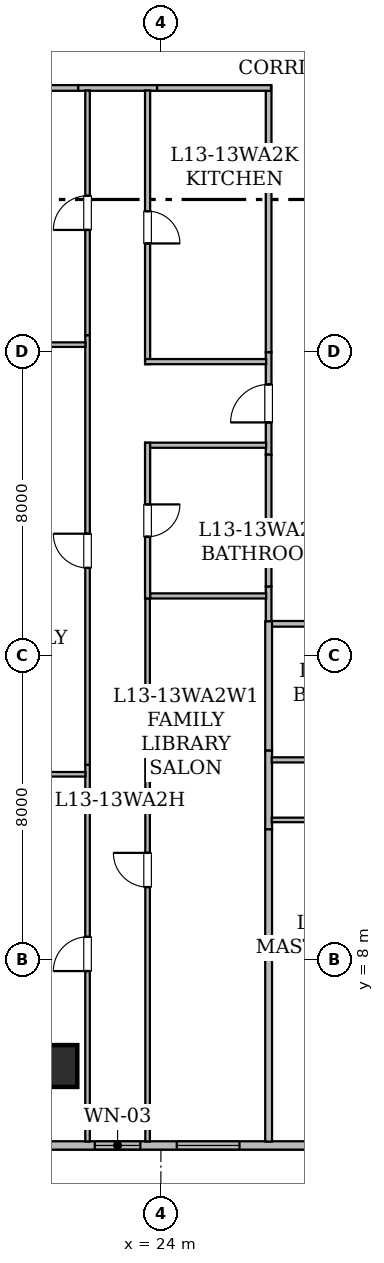
"""IFC4 building model, lengths in metres.
Left out: names, types, materials, properties, quantities, classifications, styles, units other than length and angle.
Written with IfcOpenShell. Run it as: python <this file> out.ifc"""

import sys

from ifc_helpers import new_model, si_unit, direction, frame, frame_2d, origin, origin_2d, place, context, subcontext, project, spatial, rectangle, hollow_rectangle, extrude, element, fill, save


model = new_model("IFC4")
c1 = context("Model", 3, precision=1e-05, world=origin(), true_north=direction((0.0, 1.0)))
c2 = subcontext(c1, "Body", "Model", "MODEL_VIEW")
j1 = project(units=[si_unit("LENGTHUNIT", "METRE"), si_unit("PLANEANGLEUNIT", "RADIAN")], contexts=[c1])
p1 = place(None, origin())
s1 = spatial("IfcSite", under=j1, at=p1, CompositionType="ELEMENT")
p2 = place(p1, origin())
s2 = spatial("IfcBuilding", under=s1, at=p2, CompositionType="ELEMENT")
p3 = place(p2, frame((0.0, 0.0, 55.2)))
s3 = spatial("IfcBuildingStorey", under=s2, at=p3, CompositionType="ELEMENT", Elevation=55.2)
p4 = place(p3, frame((21.25, 5.2, 0.0), z_axis=(0.0, 0.0, 1.0), x_axis=(1.0, 0.0, 0.0)))
e1 = element("IfcColumn", 1, at=p4, inside=s3, PredefinedType="COLUMN", context=c2, shape_type="SweptSolid", body=[
    extrude(hollow_rectangle(XDim=1.1, YDim=1.1, WallThickness=0.055, at=origin_2d()), origin(), (0.0, 0.0, 1.0), 3.65),
])
p5 = place(p3, frame((45.683, 3.11, 0.0), z_axis=(0.0, 0.0, 1.0), x_axis=(-1.0, 0.0, 0.0)))
e2 = element("IfcWall", 2, at=p5, inside=s3, PredefinedType="STANDARD", context=c2, shape_type="SweptSolid", body=[
    extrude(rectangle(XDim=37.368, YDim=0.22, at=frame_2d((18.684, 0.0))), origin(), (0.0, 0.0, 1.0), 3.43),
])
p6 = place(p5, frame((31.194, 0.0, 0.85)))
e3 = element("IfcOpeningElement", 3, at=p6, cuts=e2, PredefinedType="OPENING", context=c2, shape_type="SweptSolid", body=[
    extrude(rectangle(XDim=1.65, YDim=1.55, at=frame_2d((0.825, 0.775))), frame((0.0, 0.12, 0.0), z_axis=(0.0, -1.0, 0.0), x_axis=(1.0, 0.0, 0.0)), (0.0, 0.0, 1.0), 0.24),
])
p7 = place(p5, frame((19.615, 0.0, 0.85)))
e4 = element("IfcOpeningElement", 4, at=p7, cuts=e2, PredefinedType="OPENING", context=c2, shape_type="SweptSolid", body=[
    extrude(rectangle(XDim=1.65, YDim=1.55, at=frame_2d((0.825, 0.775))), frame((0.0, 0.12, 0.0), z_axis=(0.0, -1.0, 0.0), x_axis=(1.0, 0.0, 0.0)), (0.0, 0.0, 1.0), 0.24),
])
p8 = place(p5, frame((22.223, 0.0, 0.8)))
e5 = element("IfcOpeningElement", 5, at=p8, cuts=e2, PredefinedType="OPENING", context=c2, shape_type="SweptSolid", body=[
    extrude(rectangle(XDim=1.2, YDim=1.5, at=frame_2d((0.6, 0.75))), frame((0.0, 0.12, 0.0), z_axis=(0.0, -1.0, 0.0), x_axis=(1.0, 0.0, 0.0)), (0.0, 0.0, 1.0), 0.24),
])
p9 = place(p5, frame((25.65, 0.0, 0.85)))
e6 = element("IfcOpeningElement", 6, at=p9, cuts=e2, PredefinedType="OPENING", context=c2, shape_type="SweptSolid", body=[
    extrude(rectangle(XDim=1.65, YDim=1.55, at=frame_2d((0.825, 0.775))), frame((0.0, 0.12, 0.0), z_axis=(0.0, -1.0, 0.0), x_axis=(1.0, 0.0, 0.0)), (0.0, 0.0, 1.0), 0.24),
])
p10 = place(p5, frame((10.983, 0.0, 0.8)))
e7 = element("IfcOpeningElement", 7, at=p10, cuts=e2, PredefinedType="OPENING", context=c2, shape_type="SweptSolid", body=[
    extrude(rectangle(XDim=1.2, YDim=1.5, at=frame_2d((0.6, 0.75))), frame((0.0, 0.12, 0.0), z_axis=(0.0, -1.0, 0.0), x_axis=(1.0, 0.0, 0.0)), (0.0, 0.0, 1.0), 0.24),
])
p11 = place(p5, frame((14.783, 0.0, 0.85)))
e8 = element("IfcOpeningElement", 8, at=p11, cuts=e2, PredefinedType="OPENING", context=c2, shape_type="SweptSolid", body=[
    extrude(rectangle(XDim=1.65, YDim=1.55, at=frame_2d((0.825, 0.775))), frame((0.0, 0.12, 0.0), z_axis=(0.0, -1.0, 0.0), x_axis=(1.0, 0.0, 0.0)), (0.0, 0.0, 1.0), 0.24),
])
p12 = place(p5, frame((6.733, 0.0, 0.85)))
e9 = element("IfcOpeningElement", 9, at=p12, cuts=e2, PredefinedType="OPENING", context=c2, shape_type="SweptSolid", body=[
    extrude(rectangle(XDim=1.65, YDim=1.55, at=frame_2d((0.825, 0.775))), frame((0.0, 0.12, 0.0), z_axis=(0.0, -1.0, 0.0), x_axis=(1.0, 0.0, 0.0)), (0.0, 0.0, 1.0), 0.24),
])
p13 = place(p5, frame((1.738, 0.0, 0.85)))
e10 = element("IfcOpeningElement", 10, at=p13, cuts=e2, PredefinedType="OPENING", context=c2, shape_type="SweptSolid", body=[
    extrude(rectangle(XDim=1.65, YDim=1.55, at=frame_2d((0.825, 0.775))), frame((0.0, 0.12, 0.0), z_axis=(0.0, -1.0, 0.0), x_axis=(1.0, 0.0, 0.0)), (0.0, 0.0, 1.0), 0.24),
])
p14 = place(p3, frame((26.835, 16.9, 0.0), z_axis=(0.0, 0.0, 1.0), x_axis=(0.0, 1.0, 0.0)))
e11 = element("IfcWall", 11, at=p14, inside=s3, PredefinedType="STANDARD", context=c2, shape_type="SweptSolid", body=[
    extrude(rectangle(XDim=0.918, YDim=0.15, at=frame_2d((0.459, 0.0))), origin(), (0.0, 0.0, 1.0), 3.43),
])
p15 = place(p3, frame((26.835, 21.285, 0.0), z_axis=(0.0, 0.0, 1.0), x_axis=(0.0, 1.0, 0.0)))
e12 = element("IfcWall", 12, at=p15, inside=s3, PredefinedType="STANDARD", context=c2, shape_type="SweptSolid", body=[
    extrude(rectangle(XDim=2.698, YDim=0.15, at=frame_2d((1.349, 0.0))), origin(), (0.0, 0.0, 1.0), 3.43),
])
p16 = place(p15, frame((0.849, 0.0, 0.0)))
e13 = element("IfcOpeningElement", 13, at=p16, cuts=e12, PredefinedType="OPENING", context=c2, shape_type="SweptSolid", body=[
    extrude(rectangle(XDim=1.0, YDim=2.15, at=frame_2d((0.5, 1.075))), frame((0.0, 0.085, 0.0), z_axis=(0.0, -1.0, 0.0), x_axis=(1.0, 0.0, 0.0)), (0.0, 0.0, 1.0), 0.17),
])
p17 = place(p3, frame((23.9, 30.935, 0.0), z_axis=(0.0, 0.0, 1.0), x_axis=(-1.0, 0.0, 0.0)))
e14 = element("IfcWall", 14, at=p17, inside=s3, PredefinedType="STANDARD", context=c2, shape_type="SweptSolid", body=[
    extrude(rectangle(XDim=2.079, YDim=0.15, at=frame_2d((1.04, 0.0))), origin(), (0.0, 0.0, 1.0), 3.43),
])
p18 = place(p3, frame((26.835, 17.818, 0.0), z_axis=(0.0, 0.0, 1.0), x_axis=(0.0, 1.0, 0.0)))
e15 = element("IfcWall", 15, at=p18, inside=s3, PredefinedType="STANDARD", context=c2, shape_type="SweptSolid", body=[
    extrude(rectangle(XDim=3.467, YDim=0.15, at=frame_2d((1.733, 0.0))), origin(), (0.0, 0.0, 1.0), 2.647),
])
p19 = place(p3, frame((26.835, 23.983, 0.0), z_axis=(0.0, 0.0, 1.0), x_axis=(0.0, 1.0, 0.0)))
e16 = element("IfcWall", 16, at=p19, inside=s3, PredefinedType="STANDARD", context=c2, shape_type="SweptSolid", body=[
    extrude(rectangle(XDim=7.017, YDim=0.15, at=frame_2d((3.509, 0.0))), origin(), (0.0, 0.0, 1.0), 2.957),
])
p20 = place(p3, frame((26.898, 30.935, 0.0), z_axis=(0.0, 0.0, 1.0), x_axis=(-1.0, 0.0, 0.0)))
e17 = element("IfcWall", 17, at=p20, inside=s3, PredefinedType="STANDARD", context=c2, shape_type="SweptSolid", body=[
    extrude(rectangle(XDim=2.998, YDim=0.15, at=frame_2d((1.499, 0.0))), origin(), (0.0, 0.0, 1.0), 3.43),
])
p21 = place(p3, frame((21.821, 30.935, 0.0), z_axis=(0.0, 0.0, 1.0), x_axis=(-1.0, 0.0, 0.0)))
e18 = element("IfcWall", 18, at=p21, inside=s3, PredefinedType="STANDARD", context=c2, shape_type="SweptSolid", body=[
    extrude(rectangle(XDim=5.225, YDim=0.15, at=frame_2d((2.613, 0.0))), origin(), (0.0, 0.0, 1.0), 2.647),
])
p22 = place(p3, frame((31.601, 16.835, 0.0), z_axis=(0.0, 0.0, 1.0), x_axis=(-1.0, 0.0, 0.0)))
e19 = element("IfcWall", 19, at=p22, inside=s3, PredefinedType="STANDARD", context=c2, shape_type="SweptSolid", body=[
    extrude(rectangle(XDim=4.701, YDim=0.15, at=frame_2d((2.351, 0.0))), origin(), (0.0, 0.0, 1.0), 2.647),
])
p23 = place(p3, frame((23.65, 3.212, 0.0), z_axis=(0.0, 0.0, 1.0), x_axis=(0.0, 1.0, 0.0)))
e20 = element("IfcWall", 20, at=p23, inside=s3, PredefinedType="PARTITIONING", context=c2, shape_type="SweptSolid", body=[
    extrude(rectangle(XDim=14.292, YDim=0.12, at=frame_2d((7.146, 0.0))), origin(), (0.0, 0.0, 1.0), 2.803),
])
p24 = place(p23, frame((6.696, 0.0, 0.0)))
e21 = element("IfcOpeningElement", 21, at=p24, cuts=e20, PredefinedType="OPENING", context=c2, shape_type="SweptSolid", body=[
    extrude(rectangle(XDim=0.9, YDim=2.1, at=frame_2d((0.45, 1.05))), frame((0.0, 0.07, 0.0), z_axis=(0.0, -1.0, 0.0), x_axis=(1.0, 0.0, 0.0)), (0.0, 0.0, 1.0), 0.14),
])
p25 = place(p3, frame((23.715, 17.569, 0.0), z_axis=(0.0, 0.0, 1.0), x_axis=(1.0, 0.0, 0.0)))
e22 = element("IfcWall", 22, at=p25, inside=s3, PredefinedType="PARTITIONING", context=c2, shape_type="SweptSolid", body=[
    extrude(rectangle(XDim=3.055, YDim=0.135, at=frame_2d((1.527, 0.0))), origin(), (0.0, 0.0, 1.0), 3.43),
])
p26 = place(p3, frame((26.835, 13.504, 0.0), z_axis=(0.0, 0.0, 1.0), x_axis=(0.0, -1.0, 0.0)))
e23 = element("IfcWall", 23, at=p26, inside=s3, PredefinedType="STANDARD", context=c2, shape_type="SweptSolid", body=[
    extrude(rectangle(XDim=2.078, YDim=0.18, at=frame_2d((1.039, 0.0))), origin(), (0.0, 0.0, 1.0), 3.43),
])
p27 = place(p3, frame((26.835, 16.9, 0.0), z_axis=(0.0, 0.0, 1.0), x_axis=(0.0, -1.0, 0.0)))
e24 = element("IfcWall", 24, at=p27, inside=s3, PredefinedType="STANDARD", context=c2, shape_type="SweptSolid", body=[
    extrude(rectangle(XDim=3.396, YDim=0.18, at=frame_2d((1.698, 0.0))), origin(), (0.0, 0.0, 1.0), 3.43),
])
p28 = place(p3, frame((26.835, 11.426, 0.0), z_axis=(0.0, 0.0, 1.0), x_axis=(0.0, -1.0, 0.0)))
e25 = element("IfcWall", 25, at=p28, inside=s3, PredefinedType="STANDARD", context=c2, shape_type="SweptSolid", body=[
    extrude(rectangle(XDim=8.214, YDim=0.18, at=frame_2d((4.107, 0.0))), origin(), (0.0, 0.0, 1.0), 2.803),
])
p29 = place(p3, frame((26.77, 21.534, 0.0), z_axis=(0.0, 0.0, 1.0), x_axis=(-1.0, 0.0, 0.0)))
e26 = element("IfcWall", 26, at=p29, inside=s3, PredefinedType="PARTITIONING", context=c2, shape_type="SweptSolid", body=[
    extrude(rectangle(XDim=3.185, YDim=0.135, at=frame_2d((1.593, 0.0))), origin(), (0.0, 0.0, 1.0), 3.43),
])
p30 = place(p3, frame((23.65, 21.599, 0.0), z_axis=(0.0, 0.0, 1.0), x_axis=(0.0, -1.0, 0.0)))
e27 = element("IfcWall", 27, at=p30, inside=s3, PredefinedType="PARTITIONING", context=c2, shape_type="SweptSolid", body=[
    extrude(rectangle(XDim=4.095, YDim=0.135, at=frame_2d((2.048, 0.0))), origin(), (0.0, 0.0, 1.0), 2.647),
])
p31 = place(p30, frame((1.622, 0.0, 0.0)))
e28 = element("IfcOpeningElement", 28, at=p31, cuts=e27, PredefinedType="OPENING", context=c2, shape_type="SweptSolid", body=[
    extrude(rectangle(XDim=0.85, YDim=2.1, at=frame_2d((0.425, 1.05))), frame((0.0, 0.077, 0.0), z_axis=(0.0, -1.0, 0.0), x_axis=(1.0, 0.0, 0.0)), (0.0, 0.0, 1.0), 0.155),
])
p32 = place(p3, frame((23.65, 30.868, 0.0), z_axis=(0.0, 0.0, 1.0), x_axis=(0.0, -1.0, 0.0)))
e29 = element("IfcWall", 29, at=p32, inside=s3, PredefinedType="PARTITIONING", context=c2, shape_type="SweptSolid", body=[
    extrude(rectangle(XDim=7.199, YDim=0.135, at=frame_2d((3.6, 0.0))), origin(), (0.0, 0.0, 1.0), 2.957),
])
p33 = place(p32, frame((3.175, 0.0, 0.0)))
e30 = element("IfcOpeningElement", 30, at=p33, cuts=e29, PredefinedType="OPENING", context=c2, shape_type="SweptSolid", body=[
    extrude(rectangle(XDim=0.85, YDim=2.1, at=frame_2d((0.425, 1.05))), frame((0.0, 0.077, 0.0), z_axis=(0.0, -1.0, 0.0), x_axis=(1.0, 0.0, 0.0)), (0.0, 0.0, 1.0), 0.155),
])
p34 = place(p3, frame((23.585, 23.734, 0.0), z_axis=(0.0, 0.0, 1.0), x_axis=(1.0, 0.0, 0.0)))
e31 = element("IfcWall", 31, at=p34, inside=s3, PredefinedType="PARTITIONING", context=c2, shape_type="SweptSolid", body=[
    extrude(rectangle(XDim=3.185, YDim=0.135, at=frame_2d((1.593, 0.0))), origin(), (0.0, 0.0, 1.0), 3.43),
])
p35 = place(p3, frame((22.07, 3.212, 0.0), z_axis=(0.0, 0.0, 1.0), x_axis=(0.0, 1.0, 0.0)))
e32 = element("IfcWall", 32, at=p35, inside=s3, PredefinedType="PARTITIONING", context=c2, shape_type="SweptSolid", body=[
    extrude(rectangle(XDim=9.913, YDim=0.12, at=frame_2d((4.957, 0.0))), origin(), (0.0, 0.0, 1.0), 2.803),
])
p36 = place(p35, frame((4.486, 0.0, 0.0)))
e33 = element("IfcOpeningElement", 33, at=p36, cuts=e32, PredefinedType="OPENING", context=c2, shape_type="SweptSolid", body=[
    extrude(rectangle(XDim=0.9, YDim=2.1, at=frame_2d((0.45, 1.05))), frame((0.0, 0.07, 0.0), z_axis=(0.0, -1.0, 0.0), x_axis=(1.0, 0.0, 0.0)), (0.0, 0.0, 1.0), 0.14),
])
p37 = place(p3, frame((22.07, 13.125, 0.0), z_axis=(0.0, 0.0, 1.0), x_axis=(0.0, 1.0, 0.0)))
e34 = element("IfcWall", 34, at=p37, inside=s3, PredefinedType="PARTITIONING", context=c2, shape_type="SweptSolid", body=[
    extrude(rectangle(XDim=11.305, YDim=0.12, at=frame_2d((5.652, 0.0))), origin(), (0.0, 0.0, 1.0), 2.647),
])
p38 = place(p37, frame((5.181, 0.0, 0.0)))
e35 = element("IfcOpeningElement", 35, at=p38, cuts=e34, PredefinedType="OPENING", context=c2, shape_type="SweptSolid", body=[
    extrude(rectangle(XDim=0.9, YDim=2.1, at=frame_2d((0.45, 1.05))), frame((0.0, 0.07, 0.0), z_axis=(0.0, -1.0, 0.0), x_axis=(1.0, 0.0, 0.0)), (0.0, 0.0, 1.0), 0.14),
])
p39 = place(p3, frame((22.07, 24.43, 0.0), z_axis=(0.0, 0.0, 1.0), x_axis=(0.0, 1.0, 0.0)))
e36 = element("IfcWall", 36, at=p39, inside=s3, PredefinedType="PARTITIONING", context=c2, shape_type="SweptSolid", body=[
    extrude(rectangle(XDim=6.438, YDim=0.12, at=frame_2d((3.219, 0.0))), origin(), (0.0, 0.0, 1.0), 2.957),
])
p40 = place(p39, frame((2.769, 0.0, 0.0)))
e37 = element("IfcOpeningElement", 37, at=p40, cuts=e36, PredefinedType="OPENING", context=c2, shape_type="SweptSolid", body=[
    extrude(rectangle(XDim=0.9, YDim=2.1, at=frame_2d((0.45, 1.05))), frame((0.0, 0.07, 0.0), z_axis=(0.0, -1.0, 0.0), x_axis=(1.0, 0.0, 0.0)), (0.0, 0.0, 1.0), 0.14),
])
p41 = place(p3, frame((16.428, 12.876, 0.0), z_axis=(0.0, 0.0, 1.0), x_axis=(1.0, 0.0, 0.0)))
e38 = element("IfcWall", 38, at=p41, inside=s3, PredefinedType="PARTITIONING", context=c2, shape_type="SweptSolid", body=[
    extrude(rectangle(XDim=5.588, YDim=0.12, at=frame_2d((2.794, 0.0))), origin(), (0.0, 0.0, 1.0), 2.647),
])
p42 = place(p41, frame((2.344, 0.0, 0.0)))
e39 = element("IfcOpeningElement", 39, at=p42, cuts=e38, PredefinedType="OPENING", context=c2, shape_type="SweptSolid", body=[
    extrude(rectangle(XDim=0.9, YDim=2.1, at=frame_2d((0.45, 1.05))), frame((0.0, 0.07, 0.0), z_axis=(0.0, -1.0, 0.0), x_axis=(1.0, 0.0, 0.0)), (0.0, 0.0, 1.0), 0.14),
])
p43 = place(p3, frame((16.428, 24.181, 0.0), z_axis=(0.0, 0.0, 1.0), x_axis=(1.0, 0.0, 0.0)))
e40 = element("IfcWall", 40, at=p43, inside=s3, PredefinedType="PARTITIONING", context=c2, shape_type="SweptSolid", body=[
    extrude(rectangle(XDim=5.588, YDim=0.12, at=frame_2d((2.794, 0.0))), origin(), (0.0, 0.0, 1.0), 2.647),
])
p44 = place(p43, frame((2.344, 0.0, 0.0)))
e41 = element("IfcOpeningElement", 41, at=p44, cuts=e40, PredefinedType="OPENING", context=c2, shape_type="SweptSolid", body=[
    extrude(rectangle(XDim=0.9, YDim=2.1, at=frame_2d((0.45, 1.05))), frame((0.0, 0.07, 0.0), z_axis=(0.0, -1.0, 0.0), x_axis=(1.0, 0.0, 0.0)), (0.0, 0.0, 1.0), 0.14),
])
p45 = place(p3, frame((26.917, 13.255, 0.0), z_axis=(0.0, 0.0, 1.0), x_axis=(1.0, 0.0, 0.0)))
e42 = element("IfcWall", 42, at=p45, inside=s3, PredefinedType="PARTITIONING", context=c2, shape_type="SweptSolid", body=[
    extrude(rectangle(XDim=4.998, YDim=0.135, at=frame_2d((2.499, 0.0))), origin(), (0.0, 0.0, 1.0), 2.647),
])
p46 = place(p45, frame((2.074, 0.0, 0.0)))
e43 = element("IfcOpeningElement", 43, at=p46, cuts=e42, PredefinedType="OPENING", context=c2, shape_type="SweptSolid", body=[
    extrude(rectangle(XDim=0.85, YDim=2.1, at=frame_2d((0.425, 1.05))), frame((0.0, 0.077, 0.0), z_axis=(0.0, -1.0, 0.0), x_axis=(1.0, 0.0, 0.0)), (0.0, 0.0, 1.0), 0.155),
])
p47 = place(p3, frame((33.38, 11.675, 0.0), z_axis=(0.0, 0.0, 1.0), x_axis=(-1.0, 0.0, 0.0)))
e44 = element("IfcWall", 44, at=p47, inside=s3, PredefinedType="PARTITIONING", context=c2, shape_type="SweptSolid", body=[
    extrude(rectangle(XDim=6.463, YDim=0.12, at=frame_2d((3.231, 0.0))), origin(), (0.0, 0.0, 1.0), 2.647),
])
p48 = place(p7, origin())
e45 = element("IfcWindow", 45, at=p48, inside=s3, PartitioningType="SINGLE_PANEL", PredefinedType="WINDOW", context=c2, shape_type="SweptSolid", body=[
    extrude(rectangle(XDim=1.65, YDim=1.55, at=frame_2d((0.825, 0.775))), frame((0.0, 0.03, 0.0), z_axis=(0.0, -1.0, 0.0), x_axis=(1.0, 0.0, 0.0)), (0.0, 0.0, 1.0), 0.06),
])
fill(e4, e45)
p49 = place(p8, origin())
e46 = element("IfcWindow", 46, at=p49, inside=s3, PartitioningType="SINGLE_PANEL", PredefinedType="WINDOW", context=c2, shape_type="SweptSolid", body=[
    extrude(rectangle(XDim=1.2, YDim=1.5, at=frame_2d((0.6, 0.75))), frame((0.0, 0.03, 0.0), z_axis=(0.0, -1.0, 0.0), x_axis=(1.0, 0.0, 0.0)), (0.0, 0.0, 1.0), 0.06),
])
fill(e5, e46)
p50 = place(p16, origin())
e47 = element("IfcDoor", 47, at=p50, inside=s3, OperationType="SINGLE_SWING_LEFT", PredefinedType="DOOR", context=c2, shape_type="SweptSolid", body=[
    extrude(rectangle(XDim=1.0, YDim=2.15, at=frame_2d((0.5, 1.075))), frame((0.0, 0.025, 0.0), z_axis=(0.0, -1.0, 0.0), x_axis=(1.0, 0.0, 0.0)), (0.0, 0.0, 1.0), 0.05),
])
fill(e13, e47)
p51 = place(p24, origin())
e48 = element("IfcDoor", 48, at=p51, inside=s3, OperationType="SINGLE_SWING_RIGHT", PredefinedType="DOOR", context=c2, shape_type="SweptSolid", body=[
    extrude(rectangle(XDim=0.9, YDim=2.1, at=frame_2d((0.45, 1.05))), frame((0.0, 0.025, 0.0), z_axis=(0.0, -1.0, 0.0), x_axis=(1.0, 0.0, 0.0)), (0.0, 0.0, 1.0), 0.05),
])
fill(e21, e48)
p52 = place(p31, origin())
e49 = element("IfcDoor", 49, at=p52, inside=s3, OperationType="SINGLE_SWING_LEFT", PredefinedType="DOOR", context=c2, shape_type="SweptSolid", body=[
    extrude(rectangle(XDim=0.85, YDim=2.1, at=frame_2d((0.425, 1.05))), frame((0.0, 0.025, 0.0), z_axis=(0.0, -1.0, 0.0), x_axis=(1.0, 0.0, 0.0)), (0.0, 0.0, 1.0), 0.05),
])
fill(e28, e49)
p53 = place(p33, origin())
e50 = element("IfcDoor", 50, at=p53, inside=s3, OperationType="SINGLE_SWING_RIGHT", PredefinedType="DOOR", context=c2, shape_type="SweptSolid", body=[
    extrude(rectangle(XDim=0.85, YDim=2.1, at=frame_2d((0.425, 1.05))), frame((0.0, 0.025, 0.0), z_axis=(0.0, -1.0, 0.0), x_axis=(1.0, 0.0, 0.0)), (0.0, 0.0, 1.0), 0.05),
])
fill(e30, e50)
p54 = place(p36, origin())
e51 = element("IfcDoor", 51, at=p54, inside=s3, OperationType="SINGLE_SWING_LEFT", PredefinedType="DOOR", context=c2, shape_type="SweptSolid", body=[
    extrude(rectangle(XDim=0.9, YDim=2.1, at=frame_2d((0.45, 1.05))), frame((0.0, 0.025, 0.0), z_axis=(0.0, -1.0, 0.0), x_axis=(1.0, 0.0, 0.0)), (0.0, 0.0, 1.0), 0.05),
])
fill(e33, e51)
p55 = place(p38, origin())
e52 = element("IfcDoor", 52, at=p55, inside=s3, OperationType="SINGLE_SWING_RIGHT", PredefinedType="DOOR", context=c2, shape_type="SweptSolid", body=[
    extrude(rectangle(XDim=0.9, YDim=2.1, at=frame_2d((0.45, 1.05))), frame((0.0, 0.025, 0.0), z_axis=(0.0, -1.0, 0.0), x_axis=(1.0, 0.0, 0.0)), (0.0, 0.0, 1.0), 0.05),
])
fill(e35, e52)
p56 = place(p40, origin())
e53 = element("IfcDoor", 53, at=p56, inside=s3, OperationType="SINGLE_SWING_LEFT", PredefinedType="DOOR", context=c2, shape_type="SweptSolid", body=[
    extrude(rectangle(XDim=0.9, YDim=2.1, at=frame_2d((0.45, 1.05))), frame((0.0, 0.025, 0.0), z_axis=(0.0, -1.0, 0.0), x_axis=(1.0, 0.0, 0.0)), (0.0, 0.0, 1.0), 0.05),
])
fill(e37, e53)
save(model, sys.argv[1])
